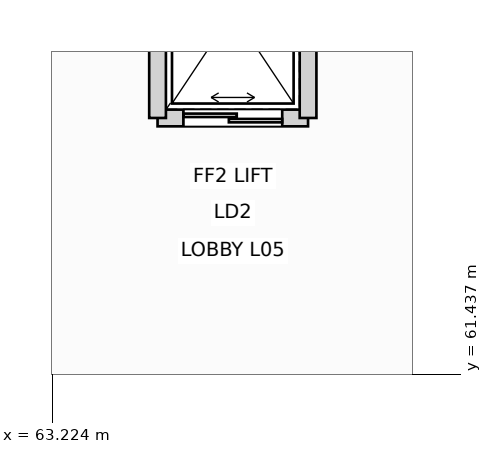
"""IFC4 building model, lengths in metres.
Left out: names, types, materials, properties, quantities, classifications, styles, units other than length and angle.
Written with IfcOpenShell. Run it as: python <this file> out.ifc"""

import sys

from ifc_helpers import new_model, si_unit, direction, frame, frame_2d, origin, place, context, subcontext, project, spatial, rectangle, extrude, element, fill, save


model = new_model("IFC4")
c1 = context("Model", 3, precision=1e-05, world=origin(), true_north=direction((0.0, 1.0)))
c2 = subcontext(c1, "Body", "Model", "MODEL_VIEW")
j1 = project(units=[si_unit("LENGTHUNIT", "METRE"), si_unit("PLANEANGLEUNIT", "RADIAN")], contexts=[c1])
p1 = place(None, origin())
s1 = spatial("IfcSite", under=j1, at=p1, CompositionType="ELEMENT")
p2 = place(p1, origin())
s2 = spatial("IfcBuilding", under=s1, at=p2, CompositionType="ELEMENT")
p3 = place(p2, frame((0.0, 0.0, 26.4)))
s3 = spatial("IfcBuildingStorey", under=s2, at=p3, CompositionType="ELEMENT", Elevation=26.4)
p4 = place(p3, frame((64.61, 64.81, 0.0), z_axis=(0.0, 0.0, 1.0), x_axis=(1.0, 0.0, 0.0)))
e1 = element("IfcWall", 1, at=p4, inside=s3, PredefinedType="PARTITIONING", context=c2, shape_type="SweptSolid", body=[
    extrude(rectangle(XDim=1.98, YDim=0.22, at=frame_2d((0.99, 0.0))), origin(), (0.0, 0.0, 1.0), 3.905),
])
p5 = place(p4, frame((0.34, 0.0, 0.0)))
e2 = element("IfcOpeningElement", 2, at=p5, cuts=e1, PredefinedType="OPENING", context=c2, shape_type="SweptSolid", body=[
    extrude(rectangle(XDim=1.3, YDim=2.2, at=frame_2d((0.65, 1.1))), frame((0.0, 0.12, 0.0), z_axis=(0.0, -1.0, 0.0), x_axis=(1.0, 0.0, 0.0)), (0.0, 0.0, 1.0), 0.24),
])
for number, where, z_axis, x_axis in (
    (3, (64.61, 64.81, 0.0), (0.0, 0.0, 1.0), (0.0, 1.0, 0.0)),
    (4, (66.59, 64.81, 0.0), (0.0, 0.0, 1.0), (0.0, 1.0, 0.0)),
):
    element("IfcWall", number, at=place(p3, frame(where, z_axis=z_axis, x_axis=x_axis)), inside=s3, PredefinedType="PARTITIONING", context=c2, shape_type="SweptSolid", body=[
        extrude(rectangle(XDim=2.78, YDim=0.22, at=frame_2d((1.39, 0.0))), origin(), (0.0, 0.0, 1.0), 3.455),
    ])
p6 = place(p5, origin())
e5 = element("IfcDoor", 5, at=p6, inside=s3, OperationType="DOUBLE_DOOR_SLIDING", PredefinedType="DOOR", context=c2, shape_type="SweptSolid", body=[
    extrude(rectangle(XDim=1.3, YDim=2.2, at=frame_2d((0.65, 1.1))), frame((0.0, 0.025, 0.0), z_axis=(0.0, -1.0, 0.0), x_axis=(1.0, 0.0, 0.0)), (0.0, 0.0, 1.0), 0.05),
])
fill(e2, e5)
save(model, sys.argv[1])
